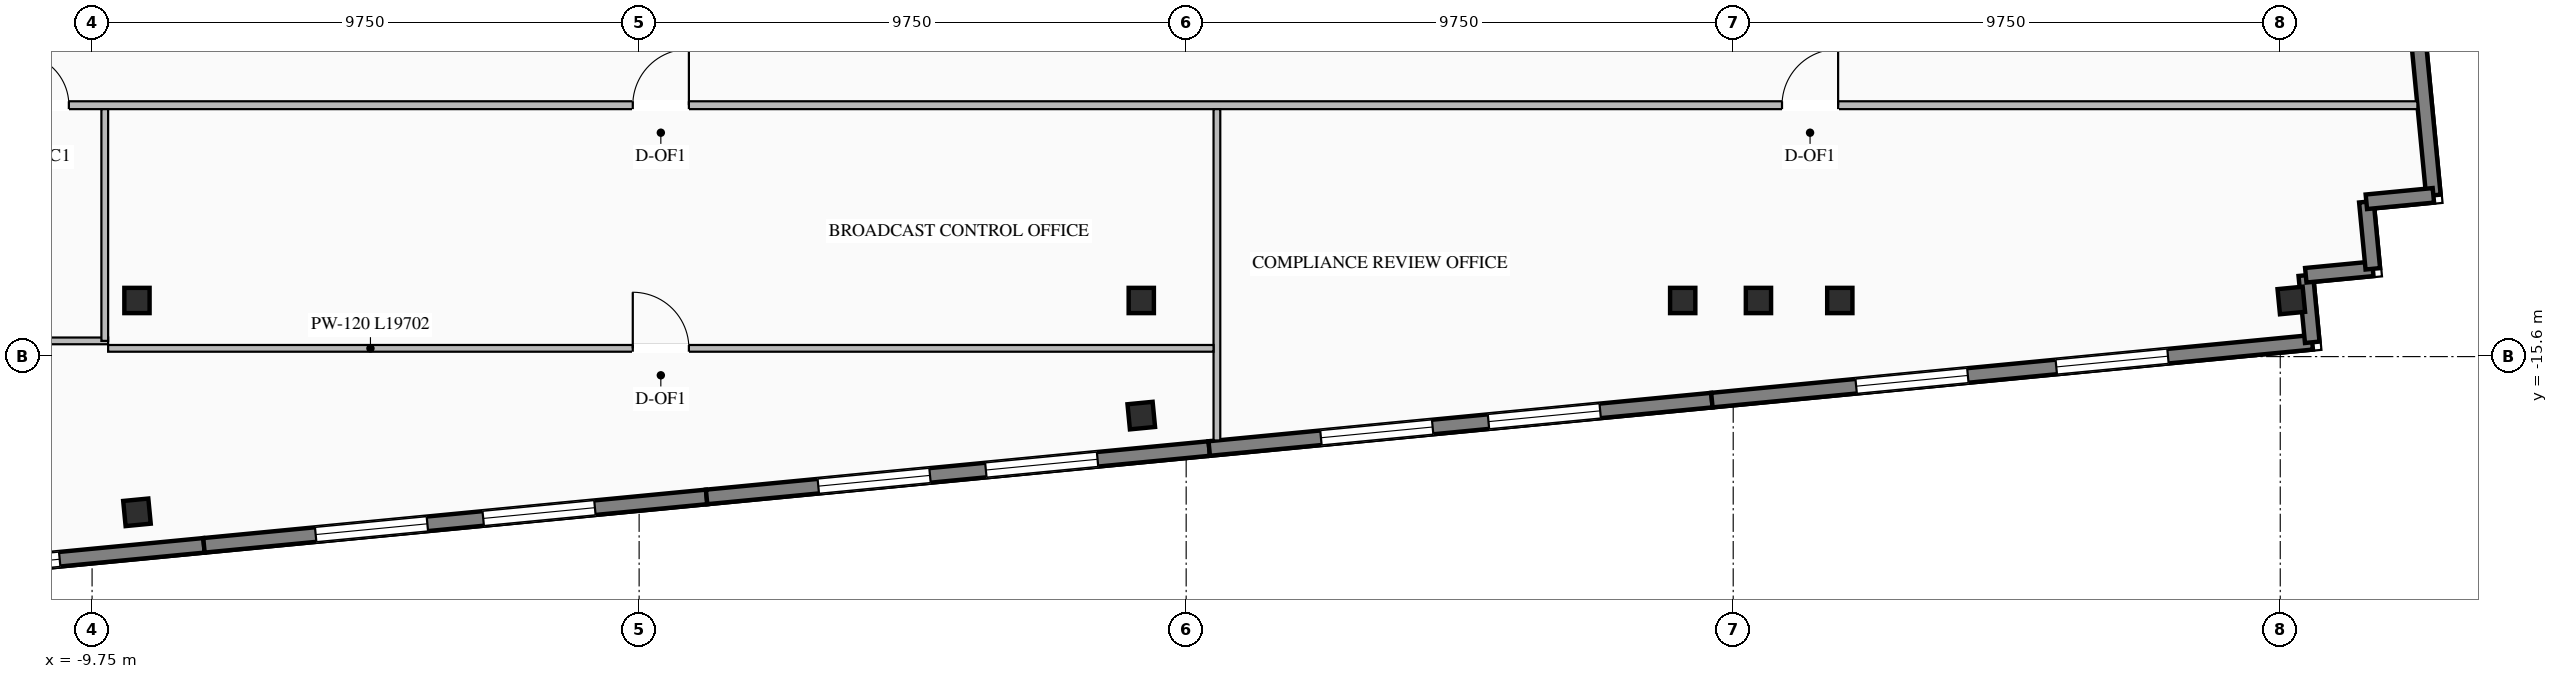
"""IFC4 building model, lengths in metres.
Left out: names, types, materials, properties, quantities, classifications, styles, units other than length and angle.
Written with IfcOpenShell. Run it as: python <this file> out.ifc"""

import sys

from ifc_helpers import new_model, si_unit, direction, frame, frame_2d, origin, origin_2d, place, context, subcontext, project, spatial, rectangle, i_section, extrude, element, fill, save


model = new_model("IFC4")
c1 = context("Model", 3, precision=1e-05, world=origin(), true_north=direction((0.0, 1.0)))
c2 = subcontext(c1, "Body", "Model", "MODEL_VIEW")
j1 = project(units=[si_unit("LENGTHUNIT", "METRE"), si_unit("PLANEANGLEUNIT", "RADIAN")], contexts=[c1])
p1 = place(None, origin())
s1 = spatial("IfcSite", under=j1, at=p1, CompositionType="ELEMENT")
p2 = place(p1, origin())
s2 = spatial("IfcBuilding", under=s1, at=p2, CompositionType="ELEMENT")
p3 = place(p2, frame((0.0, 0.0, 282.75)))
s3 = spatial("IfcBuildingStorey", under=s2, at=p3, CompositionType="ELEMENT", Elevation=282.75)
for number, where, z_axis, x_axis in (
    (1, (-8.95, -14.6, 0.0), (0.0, 0.0, 1.0), (1.0, 0.0, 0.0)),
    (2, (8.95, -14.6, 0.0), (0.0, 0.0, 1.0), (1.0, 0.0, 0.0)),
    (3, (18.6, -14.6, 0.0), (0.0, 0.0, 1.0), (1.0, 0.0, 0.0)),
    (4, (19.95, -14.6, 0.0), (0.0, 0.0, 1.0), (1.0, 0.0, 0.0)),
    (5, (21.4, -14.6, 0.0), (0.0, 0.0, 1.0), (1.0, 0.0, 0.0)),
    (6, (-8.95, -18.375, 0.0), (0.0, 0.0, 1.0), (0.995, 0.096, 0.0)),
    (7, (8.95, -16.651, 0.0), (0.0, 0.0, 1.0), (0.995, 0.096, 0.0)),
    (8, (29.447, -14.6, 0.0), (0.0, 0.0, 1.0), (0.995, 0.096, 0.0)),
):
    element("IfcColumn", number, at=place(p3, frame(where, z_axis=z_axis, x_axis=x_axis)), inside=s3, PredefinedType="COLUMN", context=c2, shape_type="SweptSolid", body=[
        extrude(i_section(OverallWidth=0.45, OverallDepth=0.45, WebThickness=0.022, FlangeThickness=0.032, at=origin_2d()), origin(), (0.0, 0.0, 1.0), 4.2),
    ])
p4 = place(p3, frame((-7.756, -18.963, 0.0), z_axis=(0.0, 0.0, 1.0), x_axis=(-0.995396745868, -0.095840066339, 0.0)))
e9 = element("IfcWall", 9, at=p4, inside=s3, PredefinedType="STANDARD", context=c2, shape_type="SweptSolid", body=[
    extrude(rectangle(XDim=10.75, YDim=0.26, at=frame_2d((5.375, 0.0))), origin(), (0.0, 0.0, 1.0), 3.93),
])
p5 = place(p4, frame((2.583, 0.0, 0.76)))
e10 = element("IfcOpeningElement", 10, at=p5, cuts=e9, PredefinedType="OPENING", context=c2, shape_type="SweptSolid", body=[
    extrude(rectangle(XDim=2.0, YDim=2.05, at=frame_2d((1.0, 1.025))), frame((0.0, 0.14, 0.0), z_axis=(0.0, -1.0, 0.0), x_axis=(1.0, 0.0, 0.0)), (0.0, 0.0, 1.0), 0.28),
])
p6 = place(p4, frame((6.167, 0.0, 0.76)))
e11 = element("IfcOpeningElement", 11, at=p6, cuts=e9, PredefinedType="OPENING", context=c2, shape_type="SweptSolid", body=[
    extrude(rectangle(XDim=2.0, YDim=2.05, at=frame_2d((1.0, 1.025))), frame((0.0, 0.14, 0.0), z_axis=(0.0, -1.0, 0.0), x_axis=(1.0, 0.0, 0.0)), (0.0, 0.0, 1.0), 0.28),
])
p7 = place(p3, frame((1.203, -18.101, 0.0), z_axis=(0.0, 0.0, 1.0), x_axis=(-0.995397043619, -0.095836973841, 0.0)))
e12 = element("IfcWall", 12, at=p7, inside=s3, PredefinedType="STANDARD", context=c2, shape_type="SweptSolid", body=[
    extrude(rectangle(XDim=9.0, YDim=0.26, at=frame_2d((4.5, 0.0))), origin(), (0.0, 0.0, 1.0), 3.93),
])
p8 = place(p7, frame((2.0, 0.0, 0.76)))
e13 = element("IfcOpeningElement", 13, at=p8, cuts=e12, PredefinedType="OPENING", context=c2, shape_type="SweptSolid", body=[
    extrude(rectangle(XDim=2.0, YDim=2.05, at=frame_2d((1.0, 1.025))), frame((0.0, 0.14, 0.0), z_axis=(0.0, -1.0, 0.0), x_axis=(1.0, 0.0, 0.0)), (0.0, 0.0, 1.0), 0.28),
])
p9 = place(p7, frame((5.0, 0.0, 0.76)))
e14 = element("IfcOpeningElement", 14, at=p9, cuts=e12, PredefinedType="OPENING", context=c2, shape_type="SweptSolid", body=[
    extrude(rectangle(XDim=2.0, YDim=2.05, at=frame_2d((1.0, 1.025))), frame((0.0, 0.14, 0.0), z_axis=(0.0, -1.0, 0.0), x_axis=(1.0, 0.0, 0.0)), (0.0, 0.0, 1.0), 0.28),
])
p10 = place(p3, frame((10.161, -17.238, 0.0), z_axis=(0.0, 0.0, 1.0), x_axis=(-0.995394206237, -0.095866439332, 0.0)))
e15 = element("IfcWall", 15, at=p10, inside=s3, PredefinedType="STANDARD", context=c2, shape_type="SweptSolid", body=[
    extrude(rectangle(XDim=9.0, YDim=0.26, at=frame_2d((4.5, 0.0))), origin(), (0.0, 0.0, 1.0), 3.93),
])
p11 = place(p10, frame((2.0, 0.0, 0.76)))
e16 = element("IfcOpeningElement", 16, at=p11, cuts=e15, PredefinedType="OPENING", context=c2, shape_type="SweptSolid", body=[
    extrude(rectangle(XDim=2.0, YDim=2.05, at=frame_2d((1.0, 1.025))), frame((0.0, 0.14, 0.0), z_axis=(0.0, -1.0, 0.0), x_axis=(1.0, 0.0, 0.0)), (0.0, 0.0, 1.0), 0.28),
])
p12 = place(p10, frame((5.0, 0.0, 0.76)))
e17 = element("IfcOpeningElement", 17, at=p12, cuts=e15, PredefinedType="OPENING", context=c2, shape_type="SweptSolid", body=[
    extrude(rectangle(XDim=2.0, YDim=2.05, at=frame_2d((1.0, 1.025))), frame((0.0, 0.14, 0.0), z_axis=(0.0, -1.0, 0.0), x_axis=(1.0, 0.0, 0.0)), (0.0, 0.0, 1.0), 0.28),
])
p13 = place(p3, frame((19.12, -16.375, 0.0), z_axis=(0.0, 0.0, 1.0), x_axis=(-0.995396794462, -0.09583956164, 0.0)))
e18 = element("IfcWall", 18, at=p13, inside=s3, PredefinedType="STANDARD", context=c2, shape_type="SweptSolid", body=[
    extrude(rectangle(XDim=9.0, YDim=0.26, at=frame_2d((4.5, 0.0))), origin(), (0.0, 0.0, 1.0), 3.93),
])
p14 = place(p13, frame((2.0, 0.0, 0.76)))
e19 = element("IfcOpeningElement", 19, at=p14, cuts=e18, PredefinedType="OPENING", context=c2, shape_type="SweptSolid", body=[
    extrude(rectangle(XDim=2.0, YDim=2.05, at=frame_2d((1.0, 1.025))), frame((0.0, 0.14, 0.0), z_axis=(0.0, -1.0, 0.0), x_axis=(1.0, 0.0, 0.0)), (0.0, 0.0, 1.0), 0.28),
])
p15 = place(p13, frame((5.0, 0.0, 0.76)))
e20 = element("IfcOpeningElement", 20, at=p15, cuts=e18, PredefinedType="OPENING", context=c2, shape_type="SweptSolid", body=[
    extrude(rectangle(XDim=2.0, YDim=2.05, at=frame_2d((1.0, 1.025))), frame((0.0, 0.14, 0.0), z_axis=(0.0, -1.0, 0.0), x_axis=(1.0, 0.0, 0.0)), (0.0, 0.0, 1.0), 0.28),
])
p16 = place(p3, frame((29.821, -15.345, 0.0), z_axis=(0.0, 0.0, 1.0), x_axis=(-0.995396954468, -0.095837899791, 0.0)))
e21 = element("IfcWall", 21, at=p16, inside=s3, PredefinedType="STANDARD", context=c2, shape_type="SweptSolid", body=[
    extrude(rectangle(XDim=10.75, YDim=0.26, at=frame_2d((5.375, 0.0))), origin(), (0.0, 0.0, 1.0), 3.93),
])
p17 = place(p16, frame((2.583, 0.0, 0.76)))
e22 = element("IfcOpeningElement", 22, at=p17, cuts=e21, PredefinedType="OPENING", context=c2, shape_type="SweptSolid", body=[
    extrude(rectangle(XDim=2.0, YDim=2.05, at=frame_2d((1.0, 1.025))), frame((0.0, 0.14, 0.0), z_axis=(0.0, -1.0, 0.0), x_axis=(1.0, 0.0, 0.0)), (0.0, 0.0, 1.0), 0.28),
])
p18 = place(p16, frame((6.167, 0.0, 0.76)))
e23 = element("IfcOpeningElement", 23, at=p18, cuts=e21, PredefinedType="OPENING", context=c2, shape_type="SweptSolid", body=[
    extrude(rectangle(XDim=2.0, YDim=2.05, at=frame_2d((1.0, 1.025))), frame((0.0, 0.14, 0.0), z_axis=(0.0, -1.0, 0.0), x_axis=(1.0, 0.0, 0.0)), (0.0, 0.0, 1.0), 0.28),
])
p19 = place(p3, frame((30.527, 2.354, 0.0), z_axis=(0.0, 0.0, 1.0), x_axis=(0.095850890337, -0.995395703638, 0.0)))
e24 = element("IfcWall", 24, at=p19, inside=s3, PredefinedType="STANDARD", context=c2, shape_type="SweptSolid", body=[
    extrude(rectangle(XDim=15.15, YDim=0.26, at=frame_2d((7.575, 0.0))), origin(), (0.0, 0.0, 1.0), 3.93),
])
p20 = place(p19, frame((4.35, 0.0, 0.76)))
e25 = element("IfcOpeningElement", 25, at=p20, cuts=e24, PredefinedType="OPENING", context=c2, shape_type="SweptSolid", body=[
    extrude(rectangle(XDim=1.4, YDim=1.95, at=frame_2d((0.7, 0.975))), frame((0.0, 0.14, 0.0), z_axis=(0.0, -1.0, 0.0), x_axis=(1.0, 0.0, 0.0)), (0.0, 0.0, 1.0), 0.28),
])
p21 = place(p19, frame((9.4, 0.0, 0.76)))
e26 = element("IfcOpeningElement", 26, at=p21, cuts=e24, PredefinedType="OPENING", context=c2, shape_type="SweptSolid", body=[
    extrude(rectangle(XDim=1.4, YDim=1.95, at=frame_2d((0.7, 0.975))), frame((0.0, 0.14, 0.0), z_axis=(0.0, -1.0, 0.0), x_axis=(1.0, 0.0, 0.0)), (0.0, 0.0, 1.0), 0.28),
])
for number, where, z_axis, x_axis in (
    (27, (29.821, -15.345, 0.0), (0.0, 0.0, 1.0), (-0.096, 0.995, 0.0)),
    (28, (29.705, -14.15, 0.0), (0.0, 0.0, 1.0), (0.995, 0.096, 0.0)),
):
    element("IfcWall", number, at=place(p3, frame(where, z_axis=z_axis, x_axis=x_axis)), inside=s3, PredefinedType="STANDARD", context=c2, shape_type="SweptSolid", body=[
        extrude(rectangle(XDim=1.2, YDim=0.26, at=frame_2d((0.6, 0.0))), origin(), (0.0, 0.0, 1.0), 3.93),
    ])
p22 = place(p3, frame((30.9, -14.035, 0.0), z_axis=(0.0, 0.0, 1.0), x_axis=(-0.095836473879, 0.995397091755, 0.0)))
e29 = element("IfcWall", 29, at=p22, inside=s3, PredefinedType="STANDARD", context=c2, shape_type="SweptSolid", body=[
    extrude(rectangle(XDim=1.2, YDim=0.26, at=frame_2d((0.6, 0.0))), origin(), (0.0, 0.0, 1.0), 3.93),
])
p23 = place(p3, frame((30.785, -12.841, 0.0), z_axis=(0.0, 0.0, 1.0), x_axis=(0.995398960025, 0.095817067274, 0.0)))
e30 = element("IfcWall", 30, at=p23, inside=s3, PredefinedType="STANDARD", context=c2, shape_type="SweptSolid", body=[
    extrude(rectangle(XDim=1.2, YDim=0.26, at=frame_2d((0.6, 0.0))), origin(), (0.0, 0.0, 1.0), 3.93),
])
p24 = place(p3, frame((-21.591, -11.12, 0.0), z_axis=(0.0, 0.0, 1.0), x_axis=(1.0, 0.0, 0.0)))
e31 = element("IfcWall", 31, at=p24, inside=s3, PredefinedType="STANDARD", context=c2, shape_type="SweptSolid", body=[
    extrude(rectangle(XDim=53.285, YDim=0.14, at=frame_2d((26.643, 0.0))), origin(), (0.0, 0.0, 1.0), 3.93),
])
p25 = place(p24, frame((4.157, 0.0, 0.0)))
e32 = element("IfcOpeningElement", 32, at=p25, cuts=e31, PredefinedType="OPENING", context=c2, shape_type="SweptSolid", body=[
    extrude(rectangle(XDim=0.92, YDim=2.08, at=frame_2d((0.46, 1.04))), frame((0.0, 0.08, 0.0), z_axis=(0.0, -1.0, 0.0), x_axis=(1.0, 0.0, 0.0)), (0.0, 0.0, 1.0), 0.16),
])
p26 = place(p24, frame((7.657, 0.0, 0.0)))
e33 = element("IfcOpeningElement", 33, at=p26, cuts=e31, PredefinedType="OPENING", context=c2, shape_type="SweptSolid", body=[
    extrude(rectangle(XDim=0.92, YDim=2.08, at=frame_2d((0.46, 1.04))), frame((0.0, 0.08, 0.0), z_axis=(0.0, -1.0, 0.0), x_axis=(1.0, 0.0, 0.0)), (0.0, 0.0, 1.0), 0.16),
])
p27 = place(p24, frame((10.507, 0.0, 0.0)))
e34 = element("IfcOpeningElement", 34, at=p27, cuts=e31, PredefinedType="OPENING", context=c2, shape_type="SweptSolid", body=[
    extrude(rectangle(XDim=0.92, YDim=2.08, at=frame_2d((0.46, 1.04))), frame((0.0, 0.08, 0.0), z_axis=(0.0, -1.0, 0.0), x_axis=(1.0, 0.0, 0.0)), (0.0, 0.0, 1.0), 0.16),
])
p28 = place(p24, frame((21.478, 0.0, 0.0)))
e35 = element("IfcOpeningElement", 35, at=p28, cuts=e31, PredefinedType="OPENING", context=c2, shape_type="SweptSolid", body=[
    extrude(rectangle(XDim=1.0, YDim=2.08, at=frame_2d((0.5, 1.04))), frame((0.0, 0.08, 0.0), z_axis=(0.0, -1.0, 0.0), x_axis=(1.0, 0.0, 0.0)), (0.0, 0.0, 1.0), 0.16),
])
p29 = place(p24, frame((41.961, 0.0, 0.0)))
e36 = element("IfcOpeningElement", 36, at=p29, cuts=e31, PredefinedType="OPENING", context=c2, shape_type="SweptSolid", body=[
    extrude(rectangle(XDim=1.0, YDim=2.08, at=frame_2d((0.5, 1.04))), frame((0.0, 0.08, 0.0), z_axis=(0.0, -1.0, 0.0), x_axis=(1.0, 0.0, 0.0)), (0.0, 0.0, 1.0), 0.16),
])
p30 = place(p3, frame((-18.784, -15.32, 0.0), z_axis=(0.0, 0.0, 1.0), x_axis=(1.0, 0.0, 0.0)))
e37 = element("IfcWall", 37, at=p30, inside=s3, PredefinedType="STANDARD", context=c2, shape_type="SweptSolid", body=[
    extrude(rectangle(XDim=9.32, YDim=0.12, at=frame_2d((4.66, 0.0))), origin(), (0.0, 0.0, 1.0), 3.93),
])
p31 = place(p3, frame((-9.524, -15.32, 0.0), z_axis=(0.0, 0.0, 1.0), x_axis=(0.0, 1.0, 0.0)))
e38 = element("IfcWall", 38, at=p31, inside=s3, PredefinedType="STANDARD", context=c2, shape_type="SweptSolid", body=[
    extrude(rectangle(XDim=4.13, YDim=0.12, at=frame_2d((2.065, 0.0))), origin(), (0.0, 0.0, 1.0), 3.93),
])
p32 = place(p3, frame((10.298, -17.094, 0.0), z_axis=(0.0, 0.0, 1.0), x_axis=(0.0, 1.0, 0.0)))
e39 = element("IfcWall", 39, at=p32, inside=s3, PredefinedType="STANDARD", context=c2, shape_type="SweptSolid", body=[
    extrude(rectangle(XDim=5.904, YDim=0.12, at=frame_2d((2.952, 0.0))), origin(), (0.0, 0.0, 1.0), 3.93),
])
p33 = place(p3, frame((-9.464, -15.453, 0.0), z_axis=(0.0, 0.0, 1.0), x_axis=(1.0, 0.0, 0.0)))
e40 = element("IfcWall", 40, at=p33, inside=s3, PredefinedType="STANDARD", context=c2, shape_type="SweptSolid", body=[
    extrude(rectangle(XDim=19.702, YDim=0.12, at=frame_2d((9.851, 0.0))), origin(), (0.0, 0.0, 1.0), 3.93),
])
p34 = place(p33, frame((9.351, 0.0, 0.0)))
e41 = element("IfcOpeningElement", 41, at=p34, cuts=e40, PredefinedType="OPENING", context=c2, shape_type="SweptSolid", body=[
    extrude(rectangle(XDim=1.0, YDim=2.08, at=frame_2d((0.5, 1.04))), frame((0.0, 0.07, 0.0), z_axis=(0.0, -1.0, 0.0), x_axis=(1.0, 0.0, 0.0)), (0.0, 0.0, 1.0), 0.14),
])
p35 = place(p5, origin())
e42 = element("IfcWindow", 42, at=p35, inside=s3, PartitioningType="DOUBLE_PANEL_VERTICAL", PredefinedType="WINDOW", context=c2, shape_type="SweptSolid", body=[
    extrude(rectangle(XDim=2.0, YDim=2.05, at=frame_2d((1.0, 1.025))), frame((0.0, 0.03, 0.0), z_axis=(0.0, -1.0, 0.0), x_axis=(1.0, 0.0, 0.0)), (0.0, 0.0, 1.0), 0.06),
])
fill(e10, e42)
p36 = place(p8, origin())
e43 = element("IfcWindow", 43, at=p36, inside=s3, PartitioningType="DOUBLE_PANEL_VERTICAL", PredefinedType="WINDOW", context=c2, shape_type="SweptSolid", body=[
    extrude(rectangle(XDim=2.0, YDim=2.05, at=frame_2d((1.0, 1.025))), frame((0.0, 0.03, 0.0), z_axis=(0.0, -1.0, 0.0), x_axis=(1.0, 0.0, 0.0)), (0.0, 0.0, 1.0), 0.06),
])
fill(e13, e43)
p37 = place(p9, origin())
e44 = element("IfcWindow", 44, at=p37, inside=s3, PartitioningType="DOUBLE_PANEL_VERTICAL", PredefinedType="WINDOW", context=c2, shape_type="SweptSolid", body=[
    extrude(rectangle(XDim=2.0, YDim=2.05, at=frame_2d((1.0, 1.025))), frame((0.0, 0.03, 0.0), z_axis=(0.0, -1.0, 0.0), x_axis=(1.0, 0.0, 0.0)), (0.0, 0.0, 1.0), 0.06),
])
fill(e14, e44)
p38 = place(p11, origin())
e45 = element("IfcWindow", 45, at=p38, inside=s3, PartitioningType="DOUBLE_PANEL_VERTICAL", PredefinedType="WINDOW", context=c2, shape_type="SweptSolid", body=[
    extrude(rectangle(XDim=2.0, YDim=2.05, at=frame_2d((1.0, 1.025))), frame((0.0, 0.03, 0.0), z_axis=(0.0, -1.0, 0.0), x_axis=(1.0, 0.0, 0.0)), (0.0, 0.0, 1.0), 0.06),
])
fill(e16, e45)
p39 = place(p12, origin())
e46 = element("IfcWindow", 46, at=p39, inside=s3, PartitioningType="DOUBLE_PANEL_VERTICAL", PredefinedType="WINDOW", context=c2, shape_type="SweptSolid", body=[
    extrude(rectangle(XDim=2.0, YDim=2.05, at=frame_2d((1.0, 1.025))), frame((0.0, 0.03, 0.0), z_axis=(0.0, -1.0, 0.0), x_axis=(1.0, 0.0, 0.0)), (0.0, 0.0, 1.0), 0.06),
])
fill(e17, e46)
p40 = place(p14, origin())
e47 = element("IfcWindow", 47, at=p40, inside=s3, PartitioningType="DOUBLE_PANEL_VERTICAL", PredefinedType="WINDOW", context=c2, shape_type="SweptSolid", body=[
    extrude(rectangle(XDim=2.0, YDim=2.05, at=frame_2d((1.0, 1.025))), frame((0.0, 0.03, 0.0), z_axis=(0.0, -1.0, 0.0), x_axis=(1.0, 0.0, 0.0)), (0.0, 0.0, 1.0), 0.06),
])
fill(e19, e47)
p41 = place(p15, origin())
e48 = element("IfcWindow", 48, at=p41, inside=s3, PartitioningType="DOUBLE_PANEL_VERTICAL", PredefinedType="WINDOW", context=c2, shape_type="SweptSolid", body=[
    extrude(rectangle(XDim=2.0, YDim=2.05, at=frame_2d((1.0, 1.025))), frame((0.0, 0.03, 0.0), z_axis=(0.0, -1.0, 0.0), x_axis=(1.0, 0.0, 0.0)), (0.0, 0.0, 1.0), 0.06),
])
fill(e20, e48)
p42 = place(p17, origin())
e49 = element("IfcWindow", 49, at=p42, inside=s3, PartitioningType="DOUBLE_PANEL_VERTICAL", PredefinedType="WINDOW", context=c2, shape_type="SweptSolid", body=[
    extrude(rectangle(XDim=2.0, YDim=2.05, at=frame_2d((1.0, 1.025))), frame((0.0, 0.03, 0.0), z_axis=(0.0, -1.0, 0.0), x_axis=(1.0, 0.0, 0.0)), (0.0, 0.0, 1.0), 0.06),
])
fill(e22, e49)
p43 = place(p18, origin())
e50 = element("IfcWindow", 50, at=p43, inside=s3, PartitioningType="DOUBLE_PANEL_VERTICAL", PredefinedType="WINDOW", context=c2, shape_type="SweptSolid", body=[
    extrude(rectangle(XDim=2.0, YDim=2.05, at=frame_2d((1.0, 1.025))), frame((0.0, 0.03, 0.0), z_axis=(0.0, -1.0, 0.0), x_axis=(1.0, 0.0, 0.0)), (0.0, 0.0, 1.0), 0.06),
])
fill(e23, e50)
p44 = place(p27, origin())
e51 = element("IfcDoor", 51, at=p44, inside=s3, OperationType="SINGLE_SWING_LEFT", PredefinedType="DOOR", context=c2, shape_type="SweptSolid", body=[
    extrude(rectangle(XDim=0.92, YDim=2.08, at=frame_2d((0.46, 1.04))), frame((0.0, 0.025, 0.0), z_axis=(0.0, -1.0, 0.0), x_axis=(1.0, 0.0, 0.0)), (0.0, 0.0, 1.0), 0.05),
])
fill(e34, e51)
p45 = place(p28, origin())
e52 = element("IfcDoor", 52, at=p45, inside=s3, OperationType="SINGLE_SWING_RIGHT", PredefinedType="DOOR", context=c2, shape_type="SweptSolid", body=[
    extrude(rectangle(XDim=1.0, YDim=2.08, at=frame_2d((0.5, 1.04))), frame((0.0, 0.025, 0.0), z_axis=(0.0, -1.0, 0.0), x_axis=(1.0, 0.0, 0.0)), (0.0, 0.0, 1.0), 0.05),
])
fill(e35, e52)
p46 = place(p34, origin())
e53 = element("IfcDoor", 53, at=p46, inside=s3, OperationType="SINGLE_SWING_LEFT", PredefinedType="DOOR", context=c2, shape_type="SweptSolid", body=[
    extrude(rectangle(XDim=1.0, YDim=2.08, at=frame_2d((0.5, 1.04))), frame((0.0, 0.025, 0.0), z_axis=(0.0, -1.0, 0.0), x_axis=(1.0, 0.0, 0.0)), (0.0, 0.0, 1.0), 0.05),
])
fill(e41, e53)
p47 = place(p29, origin())
e54 = element("IfcDoor", 54, at=p47, inside=s3, OperationType="SINGLE_SWING_RIGHT", PredefinedType="DOOR", context=c2, shape_type="SweptSolid", body=[
    extrude(rectangle(XDim=1.0, YDim=2.08, at=frame_2d((0.5, 1.04))), frame((0.0, 0.025, 0.0), z_axis=(0.0, -1.0, 0.0), x_axis=(1.0, 0.0, 0.0)), (0.0, 0.0, 1.0), 0.05),
])
fill(e36, e54)
save(model, sys.argv[1])
